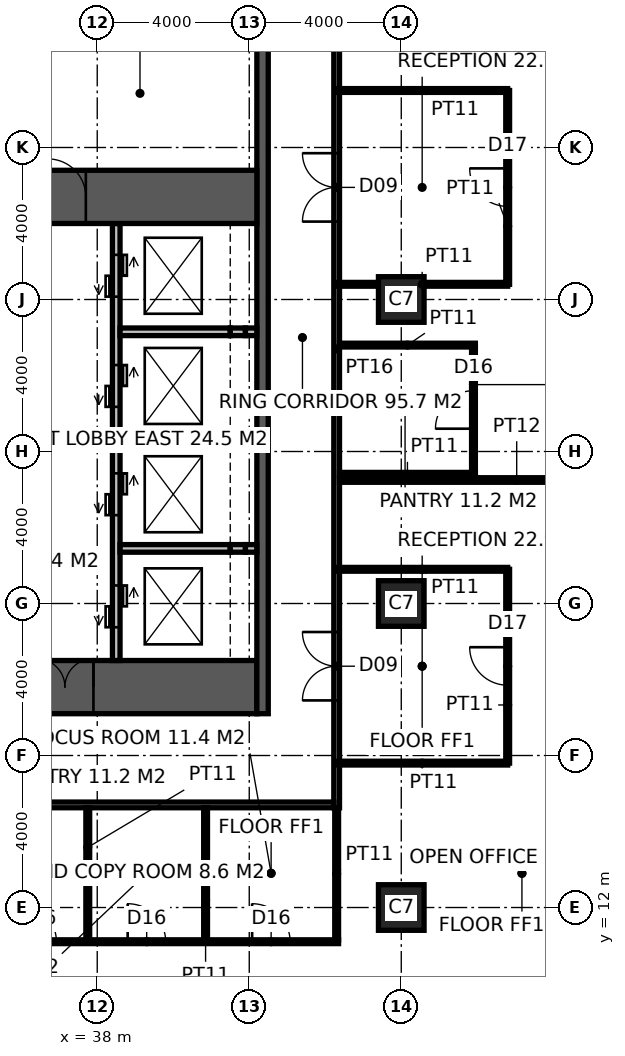
"""IFC4 building model, lengths in metres.
Left out: names, types, materials, properties, quantities, classifications, styles, units other than length and angle.
Written with IfcOpenShell. Run it as: python <this file> out.ifc"""

import sys

from ifc_helpers import new_model, si_unit, direction, frame, frame_2d, origin, origin_2d, place, context, subcontext, project, spatial, rectangle, hollow_rectangle, extrude, element, fill, save


model = new_model("IFC4")
c1 = context("Model", 3, precision=1e-05, world=origin(), true_north=direction((0.0, 1.0)))
c2 = subcontext(c1, "Body", "Model", "MODEL_VIEW")
j1 = project(units=[si_unit("LENGTHUNIT", "METRE"), si_unit("PLANEANGLEUNIT", "RADIAN")], contexts=[c1])
p1 = place(None, origin())
s1 = spatial("IfcSite", under=j1, at=p1, CompositionType="ELEMENT")
p2 = place(p1, origin())
s2 = spatial("IfcBuilding", under=s1, at=p2, CompositionType="ELEMENT")
p3 = place(p2, frame((0.0, 0.0, 63.0)))
s3 = spatial("IfcBuildingStorey", under=s2, at=p3, CompositionType="ELEMENT", Elevation=63.0)
for number, where, z_axis, x_axis in (
    (1, (46.0, 12.0, 0.0), (0.0, 0.0, 1.0), (1.0, 0.0, 0.0)),
    (2, (46.0, 20.0, 0.0), (0.0, 0.0, 1.0), (1.0, 0.0, 0.0)),
    (3, (46.0, 28.0, 0.0), (0.0, 0.0, 1.0), (1.0, 0.0, 0.0)),
):
    element("IfcColumn", number, at=place(p3, frame(where, z_axis=z_axis, x_axis=x_axis)), inside=s3, PredefinedType="COLUMN", context=c2, shape_type="SweptSolid", body=[
        extrude(hollow_rectangle(XDim=1.2, YDim=1.2, WallThickness=0.1, at=origin_2d()), origin(), (0.0, 0.0, 1.0), 4.0),
    ])
p4 = place(p3, frame((18.5, 17.8, -0.15), z_axis=(0.0, 0.0, 1.0), x_axis=(1.0, 0.0, 0.0)))
e4 = element("IfcWall", 4, at=p4, inside=s3, PredefinedType="SHEAR", context=c2, shape_type="SweptSolid", body=[
    extrude(rectangle(XDim=23.7, YDim=1.4, at=frame_2d((11.85, 0.0))), origin(), (0.0, 0.0, 1.0), 4.0),
])
p5 = place(p4, frame((3.45, 0.0, 0.15)))
e5 = element("IfcOpeningElement", 5, at=p5, cuts=e4, PredefinedType="OPENING", context=c2, shape_type="SweptSolid", body=[
    extrude(rectangle(XDim=1.5, YDim=2.4, at=frame_2d((0.75, 1.2))), frame((0.0, 0.71, 0.0), z_axis=(0.0, -1.0, 0.0), x_axis=(1.0, 0.0, 0.0)), (0.0, 0.0, 1.0), 1.42),
])
p6 = place(p4, frame((17.9, 0.0, 0.15)))
e6 = element("IfcOpeningElement", 6, at=p6, cuts=e4, PredefinedType="OPENING", context=c2, shape_type="SweptSolid", body=[
    extrude(rectangle(XDim=1.5, YDim=2.4, at=frame_2d((0.75, 1.2))), frame((0.0, 0.71, 0.0), z_axis=(0.0, -1.0, 0.0), x_axis=(1.0, 0.0, 0.0)), (0.0, 0.0, 1.0), 1.42),
])
p7 = place(p4, frame((0.9, 0.0, 0.15)))
e7 = element("IfcOpeningElement", 7, at=p7, cuts=e4, PredefinedType="OPENING", context=c2, shape_type="SweptSolid", body=[
    extrude(rectangle(XDim=1.0, YDim=2.2, at=frame_2d((0.5, 1.1))), frame((0.0, 0.71, 0.0), z_axis=(0.0, -1.0, 0.0), x_axis=(1.0, 0.0, 0.0)), (0.0, 0.0, 1.0), 1.42),
])
p8 = place(p3, frame((42.35, 17.1, -0.15), z_axis=(0.0, 0.0, 1.0), x_axis=(0.0, 1.0, 0.0)))
e8 = element("IfcWall", 8, at=p8, inside=s3, PredefinedType="SHEAR", context=c2, shape_type="SweptSolid", body=[
    extrude(rectangle(XDim=19.8, YDim=0.3, at=frame_2d((9.9, 0.0))), origin(), (0.0, 0.0, 1.0), 4.0),
])
p9 = place(p3, frame((38.5, 18.5, -0.15), z_axis=(0.0, 0.0, 1.0), x_axis=(0.0, 1.0, 0.0)))
e9 = element("IfcWall", 9, at=p9, inside=s3, PredefinedType="SOLIDWALL", context=c2, shape_type="SweptSolid", body=[
    extrude(rectangle(XDim=11.5, YDim=0.2, at=frame_2d((5.75, 0.0))), origin(), (0.0, 0.0, 1.0), 4.0),
])
p10 = place(p9, frame((0.875, 0.0, 0.15)))
e10 = element("IfcOpeningElement", 10, at=p10, cuts=e9, PredefinedType="OPENING", context=c2, shape_type="SweptSolid", body=[
    extrude(rectangle(XDim=1.1, YDim=2.2, at=frame_2d((0.55, 1.1))), frame((0.0, 0.11, 0.0), z_axis=(0.0, -1.0, 0.0), x_axis=(1.0, 0.0, 0.0)), (0.0, 0.0, 1.0), 0.22),
])
p11 = place(p9, frame((3.825, 0.0, 0.15)))
e11 = element("IfcOpeningElement", 11, at=p11, cuts=e9, PredefinedType="OPENING", context=c2, shape_type="SweptSolid", body=[
    extrude(rectangle(XDim=1.1, YDim=2.2, at=frame_2d((0.55, 1.1))), frame((0.0, 0.11, 0.0), z_axis=(0.0, -1.0, 0.0), x_axis=(1.0, 0.0, 0.0)), (0.0, 0.0, 1.0), 0.22),
])
p12 = place(p9, frame((6.675, 0.0, 0.15)))
e12 = element("IfcOpeningElement", 12, at=p12, cuts=e9, PredefinedType="OPENING", context=c2, shape_type="SweptSolid", body=[
    extrude(rectangle(XDim=1.1, YDim=2.2, at=frame_2d((0.55, 1.1))), frame((0.0, 0.11, 0.0), z_axis=(0.0, -1.0, 0.0), x_axis=(1.0, 0.0, 0.0)), (0.0, 0.0, 1.0), 0.22),
])
p13 = place(p9, frame((9.575, 0.0, 0.15)))
e13 = element("IfcOpeningElement", 13, at=p13, cuts=e9, PredefinedType="OPENING", context=c2, shape_type="SweptSolid", body=[
    extrude(rectangle(XDim=1.1, YDim=2.2, at=frame_2d((0.55, 1.1))), frame((0.0, 0.11, 0.0), z_axis=(0.0, -1.0, 0.0), x_axis=(1.0, 0.0, 0.0)), (0.0, 0.0, 1.0), 0.22),
])
p14 = place(p3, frame((36.1, 30.7, -0.15), z_axis=(0.0, 0.0, 1.0), x_axis=(1.0, 0.0, 0.0)))
e14 = element("IfcWall", 14, at=p14, inside=s3, PredefinedType="SHEAR", context=c2, shape_type="SweptSolid", body=[
    extrude(rectangle(XDim=6.1, YDim=1.4, at=frame_2d((3.05, 0.0))), origin(), (0.0, 0.0, 1.0), 4.0),
])
p15 = place(p14, frame((0.6, 0.0, 0.15)))
e15 = element("IfcOpeningElement", 15, at=p15, cuts=e14, PredefinedType="OPENING", context=c2, shape_type="SweptSolid", body=[
    extrude(rectangle(XDim=1.0, YDim=2.2, at=frame_2d((0.5, 1.1))), frame((0.0, 0.71, 0.0), z_axis=(0.0, -1.0, 0.0), x_axis=(1.0, 0.0, 0.0)), (0.0, 0.0, 1.0), 1.42),
])
p16 = place(p3, frame((38.6, 21.45, -0.15), z_axis=(0.0, 0.0, 1.0), x_axis=(1.0, 0.0, 0.0)))
e16 = element("IfcWall", 16, at=p16, inside=s3, PredefinedType="SOLIDWALL", context=c2, shape_type="SweptSolid", body=[
    extrude(rectangle(XDim=2.9, YDim=0.2, at=frame_2d((1.45, 0.0))), origin(), (0.0, 0.0, 1.0), 4.0),
])
p17 = place(p3, frame((41.5, 21.45, -0.15), z_axis=(0.0, 0.0, 1.0), x_axis=(1.0, 0.0, 0.0)))
e17 = element("IfcWall", 17, at=p17, inside=s3, PredefinedType="SOLIDWALL", context=c2, shape_type="SweptSolid", body=[
    extrude(rectangle(XDim=0.4, YDim=0.2, at=frame_2d((0.2, 0.0))), origin(), (0.0, 0.0, 1.0), 4.0),
])
p18 = place(p3, frame((41.9, 21.45, -0.15), z_axis=(0.0, 0.0, 1.0), x_axis=(1.0, 0.0, 0.0)))
e18 = element("IfcWall", 18, at=p18, inside=s3, PredefinedType="SOLIDWALL", context=c2, shape_type="SweptSolid", body=[
    extrude(rectangle(XDim=0.3, YDim=0.2, at=frame_2d((0.15, 0.0))), origin(), (0.0, 0.0, 1.0), 4.0),
])
p19 = place(p3, frame((38.6, 24.3, -0.15), z_axis=(0.0, 0.0, 1.0), x_axis=(1.0, 0.0, 0.0)))
e19 = element("IfcWall", 19, at=p19, inside=s3, PredefinedType="SOLIDWALL", context=c2, shape_type="SweptSolid", body=[
    extrude(rectangle(XDim=2.9, YDim=0.2, at=frame_2d((1.45, 0.0))), origin(), (0.0, 0.0, 1.0), 4.0),
])
p20 = place(p3, frame((41.5, 24.3, -0.15), z_axis=(0.0, 0.0, 1.0), x_axis=(1.0, 0.0, 0.0)))
e20 = element("IfcWall", 20, at=p20, inside=s3, PredefinedType="SOLIDWALL", context=c2, shape_type="SweptSolid", body=[
    extrude(rectangle(XDim=0.4, YDim=0.2, at=frame_2d((0.2, 0.0))), origin(), (0.0, 0.0, 1.0), 4.0),
])
p21 = place(p3, frame((41.9, 24.3, -0.15), z_axis=(0.0, 0.0, 1.0), x_axis=(1.0, 0.0, 0.0)))
e21 = element("IfcWall", 21, at=p21, inside=s3, PredefinedType="SOLIDWALL", context=c2, shape_type="SweptSolid", body=[
    extrude(rectangle(XDim=0.3, YDim=0.2, at=frame_2d((0.15, 0.0))), origin(), (0.0, 0.0, 1.0), 4.0),
])
p22 = place(p3, frame((38.6, 27.15, -0.15), z_axis=(0.0, 0.0, 1.0), x_axis=(1.0, 0.0, 0.0)))
e22 = element("IfcWall", 22, at=p22, inside=s3, PredefinedType="SOLIDWALL", context=c2, shape_type="SweptSolid", body=[
    extrude(rectangle(XDim=2.9, YDim=0.2, at=frame_2d((1.45, 0.0))), origin(), (0.0, 0.0, 1.0), 4.0),
])
p23 = place(p3, frame((41.5, 27.15, -0.15), z_axis=(0.0, 0.0, 1.0), x_axis=(1.0, 0.0, 0.0)))
e23 = element("IfcWall", 23, at=p23, inside=s3, PredefinedType="SOLIDWALL", context=c2, shape_type="SweptSolid", body=[
    extrude(rectangle(XDim=0.4, YDim=0.2, at=frame_2d((0.2, 0.0))), origin(), (0.0, 0.0, 1.0), 4.0),
])
p24 = place(p3, frame((41.9, 27.15, -0.15), z_axis=(0.0, 0.0, 1.0), x_axis=(1.0, 0.0, 0.0)))
e24 = element("IfcWall", 24, at=p24, inside=s3, PredefinedType="SOLIDWALL", context=c2, shape_type="SweptSolid", body=[
    extrude(rectangle(XDim=0.3, YDim=0.2, at=frame_2d((0.15, 0.0))), origin(), (0.0, 0.0, 1.0), 4.0),
])
p25 = place(p3, frame((44.3, 14.625, 0.0), z_axis=(0.0, 0.0, 1.0), x_axis=(0.0, 1.0, 0.0)))
e25 = element("IfcWall", 25, at=p25, inside=s3, PredefinedType="PARTITIONING", context=c2, shape_type="SweptSolid", body=[
    extrude(rectangle(XDim=24.15, YDim=0.15, at=frame_2d((12.075, 0.0))), origin(), (0.0, 0.0, 1.0), 3.85),
])
p26 = place(p25, frame((2.825, 0.0, 0.0)))
e26 = element("IfcOpeningElement", 26, at=p26, cuts=e25, PredefinedType="OPENING", context=c2, shape_type="SweptSolid", body=[
    extrude(rectangle(XDim=1.8, YDim=2.4, at=frame_2d((0.9, 1.2))), frame((0.0, 0.085, 0.0), z_axis=(0.0, -1.0, 0.0), x_axis=(1.0, 0.0, 0.0)), (0.0, 0.0, 1.0), 0.17),
])
p27 = place(p25, frame((15.425, 0.0, 0.0)))
e27 = element("IfcOpeningElement", 27, at=p27, cuts=e25, PredefinedType="OPENING", context=c2, shape_type="SweptSolid", body=[
    extrude(rectangle(XDim=1.8, YDim=2.4, at=frame_2d((0.9, 1.2))), frame((0.0, 0.085, 0.0), z_axis=(0.0, -1.0, 0.0), x_axis=(1.0, 0.0, 0.0)), (0.0, 0.0, 1.0), 0.17),
])
p28 = place(p3, frame((15.775, 14.7, 0.0), z_axis=(0.0, 0.0, 1.0), x_axis=(1.0, 0.0, 0.0)))
e28 = element("IfcWall", 28, at=p28, inside=s3, PredefinedType="PARTITIONING", context=c2, shape_type="SweptSolid", body=[
    extrude(rectangle(XDim=28.45, YDim=0.15, at=frame_2d((14.225, 0.0))), origin(), (0.0, 0.0, 1.0), 3.85),
])
p29 = place(p3, frame((44.375, 23.25, 0.0), z_axis=(0.0, 0.0, 1.0), x_axis=(1.0, 0.0, 0.0)))
e29 = element("IfcWall", 29, at=p29, inside=s3, PredefinedType="PARTITIONING", context=c2, shape_type="SweptSolid", body=[
    extrude(rectangle(XDim=9.325, YDim=0.12, at=frame_2d((4.663, 0.0))), origin(), (0.0, 0.0, 1.0), 3.85),
])
p30 = place(p3, frame((28.061, 11.1, 0.0), z_axis=(0.0, 0.0, 1.0), x_axis=(1.0, 0.0, 0.0)))
e30 = element("IfcWall", 30, at=p30, inside=s3, PredefinedType="PARTITIONING", context=c2, shape_type="SweptSolid", body=[
    extrude(rectangle(XDim=16.289, YDim=0.1, at=frame_2d((8.145, 0.0))), origin(), (0.0, 0.0, 1.0), 3.85),
])
p31 = place(p30, frame((1.29, 0.0, 0.0)))
e31 = element("IfcOpeningElement", 31, at=p31, cuts=e30, PredefinedType="OPENING", context=c2, shape_type="SweptSolid", body=[
    extrude(rectangle(XDim=1.0, YDim=2.2, at=frame_2d((0.5, 1.1))), frame((0.0, 0.06, 0.0), z_axis=(0.0, -1.0, 0.0), x_axis=(1.0, 0.0, 0.0)), (0.0, 0.0, 1.0), 0.12),
])
p32 = place(p30, frame((4.84, 0.0, 0.0)))
e32 = element("IfcOpeningElement", 32, at=p32, cuts=e30, PredefinedType="OPENING", context=c2, shape_type="SweptSolid", body=[
    extrude(rectangle(XDim=1.0, YDim=2.2, at=frame_2d((0.5, 1.1))), frame((0.0, 0.06, 0.0), z_axis=(0.0, -1.0, 0.0), x_axis=(1.0, 0.0, 0.0)), (0.0, 0.0, 1.0), 0.12),
])
p33 = place(p30, frame((7.865, 0.0, 0.0)))
e33 = element("IfcOpeningElement", 33, at=p33, cuts=e30, PredefinedType="OPENING", context=c2, shape_type="SweptSolid", body=[
    extrude(rectangle(XDim=1.0, YDim=2.2, at=frame_2d((0.5, 1.1))), frame((0.0, 0.06, 0.0), z_axis=(0.0, -1.0, 0.0), x_axis=(1.0, 0.0, 0.0)), (0.0, 0.0, 1.0), 0.12),
])
p34 = place(p30, frame((10.74, 0.0, 0.0)))
e34 = element("IfcOpeningElement", 34, at=p34, cuts=e30, PredefinedType="OPENING", context=c2, shape_type="SweptSolid", body=[
    extrude(rectangle(XDim=1.0, YDim=2.2, at=frame_2d((0.5, 1.1))), frame((0.0, 0.06, 0.0), z_axis=(0.0, -1.0, 0.0), x_axis=(1.0, 0.0, 0.0)), (0.0, 0.0, 1.0), 0.12),
])
p35 = place(p30, frame((14.014, 0.0, 0.0)))
e35 = element("IfcOpeningElement", 35, at=p35, cuts=e30, PredefinedType="OPENING", context=c2, shape_type="SweptSolid", body=[
    extrude(rectangle(XDim=1.0, YDim=2.2, at=frame_2d((0.5, 1.1))), frame((0.0, 0.06, 0.0), z_axis=(0.0, -1.0, 0.0), x_axis=(1.0, 0.0, 0.0)), (0.0, 0.0, 1.0), 0.12),
])
for number, where, z_axis, x_axis in (
    (36, (44.375, 23.4, 0.0), (0.0, 0.0, 1.0), (1.0, 0.0, 0.0)),
    (37, (44.375, 26.8, 0.0), (0.0, 0.0, 1.0), (1.0, 0.0, 0.0)),
):
    element("IfcWall", number, at=place(p3, frame(where, z_axis=z_axis, x_axis=x_axis)), inside=s3, PredefinedType="PARTITIONING", context=c2, shape_type="SweptSolid", body=[
        extrude(rectangle(XDim=3.575, YDim=0.1, at=frame_2d((1.788, 0.0))), origin(), (0.0, 0.0, 1.0), 3.85),
    ])
for number, where, z_axis, x_axis in (
    (38, (37.751, 11.15, 0.0), (0.0, 0.0, 1.0), (0.0, 1.0, 0.0)),
    (39, (40.851, 11.15, 0.0), (0.0, 0.0, 1.0), (0.0, 1.0, 0.0)),
    (40, (44.3, 11.15, 0.0), (0.0, 0.0, 1.0), (0.0, 1.0, 0.0)),
):
    element("IfcWall", number, at=place(p3, frame(where, z_axis=z_axis, x_axis=x_axis)), inside=s3, PredefinedType="PARTITIONING", context=c2, shape_type="SweptSolid", body=[
        extrude(rectangle(XDim=3.475, YDim=0.1, at=frame_2d((1.738, 0.0))), origin(), (0.0, 0.0, 1.0), 3.85),
    ])
p36 = place(p3, frame((47.9, 23.45, 0.0), z_axis=(0.0, 0.0, 1.0), x_axis=(0.0, 1.0, 0.0)))
e41 = element("IfcWall", 41, at=p36, inside=s3, PredefinedType="PARTITIONING", context=c2, shape_type="SweptSolid", body=[
    extrude(rectangle(XDim=3.3, YDim=0.1, at=frame_2d((1.65, 0.0))), origin(), (0.0, 0.0, 1.0), 3.85),
])
p37 = place(p36, frame((1.15, 0.0, 0.0)))
e42 = element("IfcOpeningElement", 42, at=p37, cuts=e41, PredefinedType="OPENING", context=c2, shape_type="SweptSolid", body=[
    extrude(rectangle(XDim=1.0, YDim=2.2, at=frame_2d((0.5, 1.1))), frame((0.0, 0.06, 0.0), z_axis=(0.0, -1.0, 0.0), x_axis=(1.0, 0.0, 0.0)), (0.0, 0.0, 1.0), 0.12),
])
p38 = place(p3, frame((44.3, 15.8, 0.0), z_axis=(0.0, 0.0, 1.0), x_axis=(1.0, 0.0, 0.0)))
e43 = element("IfcWall", 43, at=p38, inside=s3, PredefinedType="PARTITIONING", context=c2, shape_type="SweptSolid", body=[
    extrude(rectangle(XDim=4.5, YDim=0.1, at=frame_2d((2.25, 0.0))), origin(), (0.0, 0.0, 1.0), 3.85),
])
p39 = place(p3, frame((48.8, 15.8, 0.0), z_axis=(0.0, 0.0, 1.0), x_axis=(0.0, 1.0, 0.0)))
e44 = element("IfcWall", 44, at=p39, inside=s3, PredefinedType="PARTITIONING", context=c2, shape_type="SweptSolid", body=[
    extrude(rectangle(XDim=5.1, YDim=0.1, at=frame_2d((2.55, 0.0))), origin(), (0.0, 0.0, 1.0), 3.85),
])
p40 = place(p39, frame((2.05, 0.0, 0.0)))
e45 = element("IfcOpeningElement", 45, at=p40, cuts=e44, PredefinedType="OPENING", context=c2, shape_type="SweptSolid", body=[
    extrude(rectangle(XDim=1.0, YDim=2.2, at=frame_2d((0.5, 1.1))), frame((0.0, 0.06, 0.0), z_axis=(0.0, -1.0, 0.0), x_axis=(1.0, 0.0, 0.0)), (0.0, 0.0, 1.0), 0.12),
])
p41 = place(p3, frame((48.8, 20.9, 0.0), z_axis=(0.0, 0.0, 1.0), x_axis=(-1.0, 0.0, 0.0)))
e46 = element("IfcWall", 46, at=p41, inside=s3, PredefinedType="PARTITIONING", context=c2, shape_type="SweptSolid", body=[
    extrude(rectangle(XDim=4.5, YDim=0.1, at=frame_2d((2.25, 0.0))), origin(), (0.0, 0.0, 1.0), 3.85),
])
p42 = place(p3, frame((44.3, 28.4, 0.0), z_axis=(0.0, 0.0, 1.0), x_axis=(1.0, 0.0, 0.0)))
e47 = element("IfcWall", 47, at=p42, inside=s3, PredefinedType="PARTITIONING", context=c2, shape_type="SweptSolid", body=[
    extrude(rectangle(XDim=4.5, YDim=0.1, at=frame_2d((2.25, 0.0))), origin(), (0.0, 0.0, 1.0), 2.95),
])
p43 = place(p3, frame((48.8, 28.4, 0.0), z_axis=(0.0, 0.0, 1.0), x_axis=(0.0, 1.0, 0.0)))
e48 = element("IfcWall", 48, at=p43, inside=s3, PredefinedType="PARTITIONING", context=c2, shape_type="SweptSolid", body=[
    extrude(rectangle(XDim=5.1, YDim=0.1, at=frame_2d((2.55, 0.0))), origin(), (0.0, 0.0, 1.0), 3.85),
])
p44 = place(p43, frame((2.05, 0.0, 0.0)))
e49 = element("IfcOpeningElement", 49, at=p44, cuts=e48, PredefinedType="OPENING", context=c2, shape_type="SweptSolid", body=[
    extrude(rectangle(XDim=1.0, YDim=2.2, at=frame_2d((0.5, 1.1))), frame((0.0, 0.06, 0.0), z_axis=(0.0, -1.0, 0.0), x_axis=(1.0, 0.0, 0.0)), (0.0, 0.0, 1.0), 0.12),
])
p45 = place(p3, frame((48.8, 33.5, 0.0), z_axis=(0.0, 0.0, 1.0), x_axis=(-1.0, 0.0, 0.0)))
e50 = element("IfcWall", 50, at=p45, inside=s3, PredefinedType="PARTITIONING", context=c2, shape_type="SweptSolid", body=[
    extrude(rectangle(XDim=4.5, YDim=0.1, at=frame_2d((2.25, 0.0))), origin(), (0.0, 0.0, 1.0), 3.85),
])
p46 = place(p6, origin())
e51 = element("IfcDoor", 51, at=p46, inside=s3, OperationType="DOUBLE_DOOR_DOUBLE_SWING", PredefinedType="DOOR", context=c2, shape_type="SweptSolid", body=[
    extrude(rectangle(XDim=1.5, YDim=2.4, at=frame_2d((0.75, 1.2))), frame((0.0, 0.025, 0.0), z_axis=(0.0, -1.0, 0.0), x_axis=(1.0, 0.0, 0.0)), (0.0, 0.0, 1.0), 0.05),
])
fill(e6, e51)
p47 = place(p15, origin())
e52 = element("IfcDoor", 52, at=p47, inside=s3, OperationType="SINGLE_SWING_LEFT", PredefinedType="DOOR", context=c2, shape_type="SweptSolid", body=[
    extrude(rectangle(XDim=1.0, YDim=2.2, at=frame_2d((0.5, 1.1))), frame((0.0, 0.025, 0.0), z_axis=(0.0, -1.0, 0.0), x_axis=(1.0, 0.0, 0.0)), (0.0, 0.0, 1.0), 0.05),
])
fill(e15, e52)
p48 = place(p26, origin())
e53 = element("IfcDoor", 53, at=p48, inside=s3, OperationType="DOUBLE_DOOR_DOUBLE_SWING", PredefinedType="DOOR", context=c2, shape_type="SweptSolid", body=[
    extrude(rectangle(XDim=1.8, YDim=2.4, at=frame_2d((0.9, 1.2))), frame((0.0, 0.025, 0.0), z_axis=(0.0, -1.0, 0.0), x_axis=(1.0, 0.0, 0.0)), (0.0, 0.0, 1.0), 0.05),
])
fill(e26, e53)
p49 = place(p27, origin())
e54 = element("IfcDoor", 54, at=p49, inside=s3, OperationType="DOUBLE_DOOR_DOUBLE_SWING", PredefinedType="DOOR", context=c2, shape_type="SweptSolid", body=[
    extrude(rectangle(XDim=1.8, YDim=2.4, at=frame_2d((0.9, 1.2))), frame((0.0, 0.025, 0.0), z_axis=(0.0, -1.0, 0.0), x_axis=(1.0, 0.0, 0.0)), (0.0, 0.0, 1.0), 0.05),
])
fill(e27, e54)
p50 = place(p33, origin())
e55 = element("IfcDoor", 55, at=p50, inside=s3, OperationType="SINGLE_SWING_LEFT", PredefinedType="DOOR", context=c2, shape_type="SweptSolid", body=[
    extrude(rectangle(XDim=1.0, YDim=2.2, at=frame_2d((0.5, 1.1))), frame((0.0, 0.025, 0.0), z_axis=(0.0, -1.0, 0.0), x_axis=(1.0, 0.0, 0.0)), (0.0, 0.0, 1.0), 0.05),
])
fill(e33, e55)
p51 = place(p34, origin())
e56 = element("IfcDoor", 56, at=p51, inside=s3, OperationType="SINGLE_SWING_LEFT", PredefinedType="DOOR", context=c2, shape_type="SweptSolid", body=[
    extrude(rectangle(XDim=1.0, YDim=2.2, at=frame_2d((0.5, 1.1))), frame((0.0, 0.025, 0.0), z_axis=(0.0, -1.0, 0.0), x_axis=(1.0, 0.0, 0.0)), (0.0, 0.0, 1.0), 0.05),
])
fill(e34, e56)
p52 = place(p35, origin())
e57 = element("IfcDoor", 57, at=p52, inside=s3, OperationType="SINGLE_SWING_LEFT", PredefinedType="DOOR", context=c2, shape_type="SweptSolid", body=[
    extrude(rectangle(XDim=1.0, YDim=2.2, at=frame_2d((0.5, 1.1))), frame((0.0, 0.025, 0.0), z_axis=(0.0, -1.0, 0.0), x_axis=(1.0, 0.0, 0.0)), (0.0, 0.0, 1.0), 0.05),
])
fill(e35, e57)
p53 = place(p37, origin())
e58 = element("IfcDoor", 58, at=p53, inside=s3, OperationType="SINGLE_SWING_LEFT", PredefinedType="DOOR", context=c2, shape_type="SweptSolid", body=[
    extrude(rectangle(XDim=1.0, YDim=2.2, at=frame_2d((0.5, 1.1))), frame((0.0, 0.025, 0.0), z_axis=(0.0, -1.0, 0.0), x_axis=(1.0, 0.0, 0.0)), (0.0, 0.0, 1.0), 0.05),
])
fill(e42, e58)
p54 = place(p40, origin())
e59 = element("IfcDoor", 59, at=p54, inside=s3, OperationType="SINGLE_SWING_RIGHT", PredefinedType="DOOR", context=c2, shape_type="SweptSolid", body=[
    extrude(rectangle(XDim=1.0, YDim=2.2, at=frame_2d((0.5, 1.1))), frame((0.0, 0.025, 0.0), z_axis=(0.0, -1.0, 0.0), x_axis=(1.0, 0.0, 0.0)), (0.0, 0.0, 1.0), 0.05),
])
fill(e45, e59)
p55 = place(p44, origin())
e60 = element("IfcDoor", 60, at=p55, inside=s3, OperationType="SINGLE_SWING_RIGHT", PredefinedType="DOOR", context=c2, shape_type="SweptSolid", body=[
    extrude(rectangle(XDim=1.0, YDim=2.2, at=frame_2d((0.5, 1.1))), frame((0.0, 0.025, 0.0), z_axis=(0.0, -1.0, 0.0), x_axis=(1.0, 0.0, 0.0)), (0.0, 0.0, 1.0), 0.05),
])
fill(e49, e60)
p56 = place(p10, origin())
e61 = element("IfcDoor", 61, at=p56, inside=s3, OperationType="DOUBLE_DOOR_SLIDING", PredefinedType="DOOR", context=c2, shape_type="SweptSolid", body=[
    extrude(rectangle(XDim=1.1, YDim=2.2, at=frame_2d((0.55, 1.1))), frame((0.0, 0.025, 0.0), z_axis=(0.0, -1.0, 0.0), x_axis=(1.0, 0.0, 0.0)), (0.0, 0.0, 1.0), 0.05),
])
fill(e10, e61)
p57 = place(p11, origin())
e62 = element("IfcDoor", 62, at=p57, inside=s3, OperationType="DOUBLE_DOOR_SLIDING", PredefinedType="DOOR", context=c2, shape_type="SweptSolid", body=[
    extrude(rectangle(XDim=1.1, YDim=2.2, at=frame_2d((0.55, 1.1))), frame((0.0, 0.025, 0.0), z_axis=(0.0, -1.0, 0.0), x_axis=(1.0, 0.0, 0.0)), (0.0, 0.0, 1.0), 0.05),
])
fill(e11, e62)
p58 = place(p12, origin())
e63 = element("IfcDoor", 63, at=p58, inside=s3, OperationType="DOUBLE_DOOR_SLIDING", PredefinedType="DOOR", context=c2, shape_type="SweptSolid", body=[
    extrude(rectangle(XDim=1.1, YDim=2.2, at=frame_2d((0.55, 1.1))), frame((0.0, 0.025, 0.0), z_axis=(0.0, -1.0, 0.0), x_axis=(1.0, 0.0, 0.0)), (0.0, 0.0, 1.0), 0.05),
])
fill(e12, e63)
p59 = place(p13, origin())
e64 = element("IfcDoor", 64, at=p59, inside=s3, OperationType="DOUBLE_DOOR_SLIDING", PredefinedType="DOOR", context=c2, shape_type="SweptSolid", body=[
    extrude(rectangle(XDim=1.1, YDim=2.2, at=frame_2d((0.55, 1.1))), frame((0.0, 0.025, 0.0), z_axis=(0.0, -1.0, 0.0), x_axis=(1.0, 0.0, 0.0)), (0.0, 0.0, 1.0), 0.05),
])
fill(e13, e64)
save(model, sys.argv[1])
